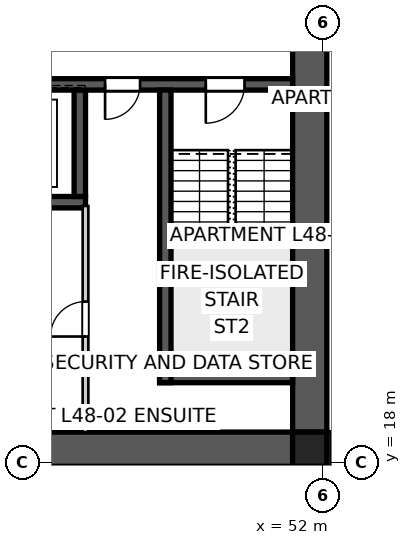
"""IFC4 building model, lengths in metres.
Left out: names, types, materials, properties, quantities, classifications, styles, units other than length and angle.
Written with IfcOpenShell. Run it as: python <this file> out.ifc"""

import sys

from ifc_helpers import new_model, si_unit, direction, frame, frame_2d, origin, origin_2d, place, context, subcontext, project, spatial, polyline, rectangle, outline, extrude, element, fill, save


model = new_model("IFC4")
c1 = context("Model", 3, precision=1e-05, world=origin(), true_north=direction((0.0, 1.0)))
c2 = subcontext(c1, "Body", "Model", "MODEL_VIEW")
j1 = project(units=[si_unit("LENGTHUNIT", "METRE"), si_unit("PLANEANGLEUNIT", "RADIAN")], contexts=[c1])
p1 = place(None, origin())
s1 = spatial("IfcSite", under=j1, at=p1, CompositionType="ELEMENT")
p2 = place(p1, origin())
s2 = spatial("IfcBuilding", under=s1, at=p2, CompositionType="ELEMENT")
p3 = place(p2, frame((0.0, 0.0, 176.0)))
s3 = spatial("IfcBuildingStorey", under=s2, at=p3, CompositionType="ELEMENT", Elevation=176.0)
p4 = place(p3, frame((51.2, 18.35, 0.0), z_axis=(0.0, 0.0, 1.0), x_axis=(-1.0, 0.0, 0.0)))
e1 = element("IfcWall", 1, at=p4, inside=s3, PredefinedType="SHEAR", context=c2, shape_type="SweptSolid", body=[
    extrude(outline(polyline([(0.0, -0.45), (22.4, -0.45), (22.4, -0.025), (22.85, -0.025), (22.85, 0.025), (22.4, 0.025), (22.4, 0.45), (0.0, 0.45), (0.0, 0.025), (-0.45, 0.025), (-0.45, -0.025), (0.0, -0.025), (0.0, -0.45)])), origin(), (0.0, 0.0, 1.0), 3.4),
])
p5 = place(p3, frame((51.65, 18.8, 0.0), z_axis=(0.0, 0.0, 1.0), x_axis=(0.0, 1.0, 0.0)))
e2 = element("IfcWall", 2, at=p5, inside=s3, PredefinedType="SHEAR", context=c2, shape_type="SweptSolid", body=[
    extrude(outline(polyline([(0.0, -0.45), (22.4, -0.45), (22.4, -0.025), (22.85, -0.025), (22.85, 0.025), (22.4, 0.025), (22.4, 0.45), (0.0, 0.45), (0.0, 0.025), (-0.45, 0.025), (-0.45, -0.025), (0.0, -0.025), (0.0, -0.45)])), origin(), (0.0, 0.0, 1.0), 3.4),
])
p6 = place(p5, frame((11.14, 0.0, 0.0)))
e3 = element("IfcOpeningElement", 3, at=p6, cuts=e2, PredefinedType="OPENING", context=c2, shape_type="SweptSolid", body=[
    extrude(rectangle(XDim=1.02, YDim=2.4, at=frame_2d((0.51, 1.2))), frame((0.0, 0.46, 0.0), z_axis=(0.0, -1.0, 0.0), x_axis=(1.0, 0.0, 0.0)), (0.0, 0.0, 1.0), 0.92),
])
p7 = place(p3, frame((51.2, 27.95, 0.0), z_axis=(0.0, 0.0, 1.0), x_axis=(-1.0, 0.0, 0.0)))
e4 = element("IfcWall", 4, at=p7, inside=s3, PredefinedType="SHEAR", context=c2, shape_type="SweptSolid", body=[
    extrude(rectangle(XDim=22.4, YDim=0.3, at=frame_2d((11.2, 0.0))), origin(), (0.0, 0.0, 1.0), 3.4),
])
p8 = place(p7, frame((19.04, 0.0, 0.0)))
e5 = element("IfcOpeningElement", 5, at=p8, cuts=e4, PredefinedType="OPENING", context=c2, shape_type="SweptSolid", body=[
    extrude(rectangle(XDim=0.92, YDim=2.1, at=frame_2d((0.46, 1.05))), frame((0.0, 0.16, 0.0), z_axis=(0.0, -1.0, 0.0), x_axis=(1.0, 0.0, 0.0)), (0.0, 0.0, 1.0), 0.32),
])
p9 = place(p7, frame((1.265, 0.0, 0.0)))
e6 = element("IfcOpeningElement", 6, at=p9, cuts=e4, PredefinedType="OPENING", context=c2, shape_type="SweptSolid", body=[
    extrude(rectangle(XDim=1.02, YDim=2.1, at=frame_2d((0.51, 1.05))), frame((0.0, 0.16, 0.0), z_axis=(0.0, -1.0, 0.0), x_axis=(1.0, 0.0, 0.0)), (0.0, 0.0, 1.0), 0.32),
])
p10 = place(p7, frame((4.015, 0.0, 0.0)))
e7 = element("IfcOpeningElement", 7, at=p10, cuts=e4, PredefinedType="OPENING", context=c2, shape_type="SweptSolid", body=[
    extrude(rectangle(XDim=0.92, YDim=2.1, at=frame_2d((0.46, 1.05))), frame((0.0, 0.16, 0.0), z_axis=(0.0, -1.0, 0.0), x_axis=(1.0, 0.0, 0.0)), (0.0, 0.0, 1.0), 0.32),
])
p11 = place(p7, frame((6.45, 0.0, 0.0)))
e8 = element("IfcOpeningElement", 8, at=p11, cuts=e4, PredefinedType="OPENING", context=c2, shape_type="SweptSolid", body=[
    extrude(rectangle(XDim=1.1, YDim=2.1, at=frame_2d((0.55, 1.05))), frame((0.0, 0.16, 0.0), z_axis=(0.0, -1.0, 0.0), x_axis=(1.0, 0.0, 0.0)), (0.0, 0.0, 1.0), 0.32),
])
p12 = place(p7, frame((9.25, 0.0, 0.0)))
e9 = element("IfcOpeningElement", 9, at=p12, cuts=e4, PredefinedType="OPENING", context=c2, shape_type="SweptSolid", body=[
    extrude(rectangle(XDim=1.1, YDim=2.1, at=frame_2d((0.55, 1.05))), frame((0.0, 0.16, 0.0), z_axis=(0.0, -1.0, 0.0), x_axis=(1.0, 0.0, 0.0)), (0.0, 0.0, 1.0), 0.32),
])
p13 = place(p7, frame((14.85, 0.0, 0.0)))
e10 = element("IfcOpeningElement", 10, at=p13, cuts=e4, PredefinedType="OPENING", context=c2, shape_type="SweptSolid", body=[
    extrude(rectangle(XDim=1.1, YDim=2.1, at=frame_2d((0.55, 1.05))), frame((0.0, 0.16, 0.0), z_axis=(0.0, -1.0, 0.0), x_axis=(1.0, 0.0, 0.0)), (0.0, 0.0, 1.0), 0.32),
])
p14 = place(p3, frame((45.75, 24.85, 0.0), z_axis=(0.0, 0.0, 1.0), x_axis=(-1.0, 0.0, 0.0)))
e11 = element("IfcWall", 11, at=p14, inside=s3, PredefinedType="SHEAR", context=c2, shape_type="SweptSolid", body=[
    extrude(rectangle(XDim=11.5, YDim=0.3, at=frame_2d((5.75, 0.0))), origin(), (0.0, 0.0, 1.0), 3.4),
])
p15 = place(p3, frame((45.6, 27.8, 0.0), z_axis=(0.0, 0.0, 1.0), x_axis=(0.0, -1.0, 0.0)))
e12 = element("IfcWall", 12, at=p15, inside=s3, PredefinedType="SHEAR", context=c2, shape_type="SweptSolid", body=[
    extrude(rectangle(XDim=2.8, YDim=0.3, at=frame_2d((1.4, 0.0))), origin(), (0.0, 0.0, 1.0), 3.4),
])
p16 = place(p3, frame((47.85, 27.8, 0.0), z_axis=(0.0, 0.0, 1.0), x_axis=(0.0, -1.0, 0.0)))
e13 = element("IfcWall", 13, at=p16, inside=s3, PredefinedType="SHEAR", context=c2, shape_type="SweptSolid", body=[
    extrude(rectangle(XDim=7.7, YDim=0.3, at=frame_2d((3.85, 0.0))), origin(), (0.0, 0.0, 1.0), 3.4),
])
p17 = place(p3, frame((51.2, 20.25, 0.0), z_axis=(0.0, 0.0, 1.0), x_axis=(-1.0, 0.0, 0.0)))
e14 = element("IfcWall", 14, at=p17, inside=s3, PredefinedType="SHEAR", context=c2, shape_type="SweptSolid", body=[
    extrude(rectangle(XDim=3.5, YDim=0.3, at=frame_2d((1.75, 0.0))), origin(), (0.0, 0.0, 1.0), 3.4),
])
p18 = place(p3, frame((51.65, 18.35, 0.0), z_axis=(0.0, 0.0, 1.0), x_axis=(1.0, 0.0, 0.0)))
e15 = element("IfcColumn", 15, at=p18, inside=s3, PredefinedType="COLUMN", context=c2, shape_type="SweptSolid", body=[
    extrude(rectangle(XDim=0.9, YDim=0.9, at=origin_2d()), origin(), (0.0, 0.0, 1.0), 3.4),
])
p19 = place(p3, frame((45.75, 18.8, 0.0), z_axis=(0.0, 0.0, 1.0), x_axis=(0.0, 1.0, 0.0)))
e16 = element("IfcWall", 16, at=p19, inside=s3, PredefinedType="SOLIDWALL", context=c2, shape_type="SweptSolid", body=[
    extrude(rectangle(XDim=5.95, YDim=0.15, at=frame_2d((2.975, 0.0))), origin(), (0.0, 0.0, 1.0), 3.25),
])
p20 = place(p19, frame((2.515, 0.0, 0.0)))
e17 = element("IfcOpeningElement", 17, at=p20, cuts=e16, PredefinedType="OPENING", context=c2, shape_type="SweptSolid", body=[
    extrude(rectangle(XDim=0.92, YDim=2.1, at=frame_2d((0.46, 1.05))), frame((0.0, 0.085, 0.0), z_axis=(0.0, -1.0, 0.0), x_axis=(1.0, 0.0, 0.0)), (0.0, 0.0, 1.0), 0.17),
])
p21 = place(p3, frame((52.1, 15.65, 0.0), z_axis=(0.0, 0.0, 1.0), x_axis=(0.0, 1.0, 0.0)))
e18 = element("IfcWall", 18, at=p21, inside=s3, PredefinedType="PARTITIONING", context=c2, shape_type="SweptSolid", body=[
    extrude(rectangle(XDim=3.17, YDim=0.2, at=frame_2d((1.585, 0.0))), origin(), (0.0, 0.0, 1.0), 3.25),
])
p22 = place(p9, origin())
e19 = element("IfcDoor", 19, at=p22, inside=s3, OperationType="SINGLE_SWING_RIGHT", PredefinedType="DOOR", context=c2, shape_type="SweptSolid", body=[
    extrude(rectangle(XDim=1.02, YDim=2.1, at=frame_2d((0.51, 1.05))), frame((0.0, 0.025, 0.0), z_axis=(0.0, -1.0, 0.0), x_axis=(1.0, 0.0, 0.0)), (0.0, 0.0, 1.0), 0.05),
])
fill(e6, e19)
p23 = place(p10, origin())
e20 = element("IfcDoor", 20, at=p23, inside=s3, OperationType="SINGLE_SWING_RIGHT", PredefinedType="DOOR", context=c2, shape_type="SweptSolid", body=[
    extrude(rectangle(XDim=0.92, YDim=2.1, at=frame_2d((0.46, 1.05))), frame((0.0, 0.025, 0.0), z_axis=(0.0, -1.0, 0.0), x_axis=(1.0, 0.0, 0.0)), (0.0, 0.0, 1.0), 0.05),
])
fill(e7, e20)
p24 = place(p20, origin())
e21 = element("IfcDoor", 21, at=p24, inside=s3, OperationType="SINGLE_SWING_LEFT", PredefinedType="DOOR", context=c2, shape_type="SweptSolid", body=[
    extrude(rectangle(XDim=0.92, YDim=2.1, at=frame_2d((0.46, 1.05))), frame((0.0, 0.025, 0.0), z_axis=(0.0, -1.0, 0.0), x_axis=(1.0, 0.0, 0.0)), (0.0, 0.0, 1.0), 0.05),
])
fill(e17, e21)
save(model, sys.argv[1])
